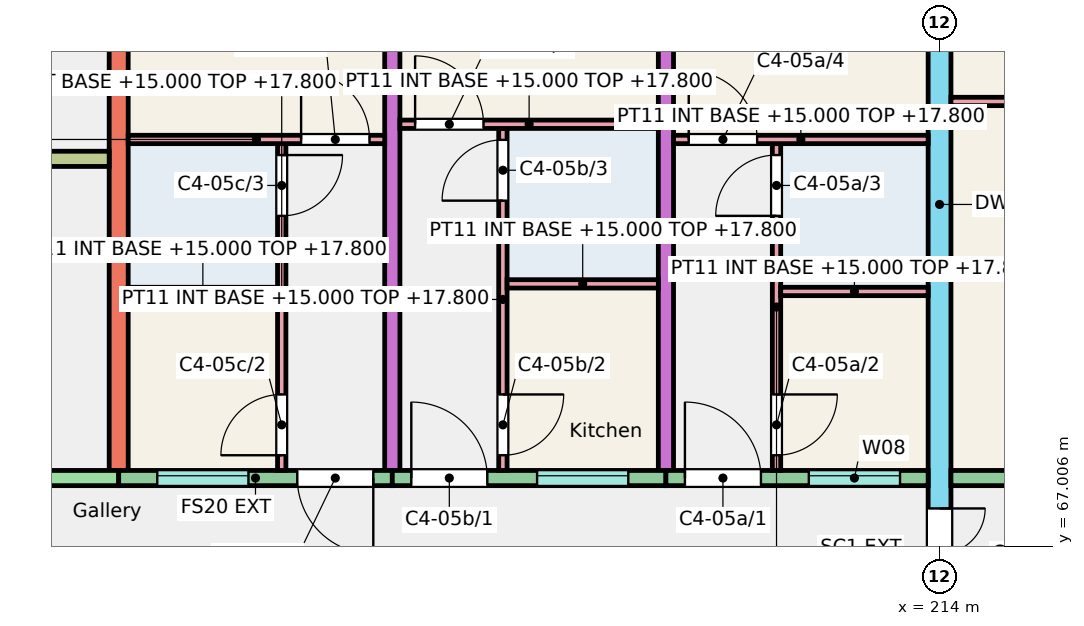
"""IFC4 building model, lengths in metres.
Left out: names, types, materials, properties, quantities, classifications, styles, units other than length and angle.
Written with IfcOpenShell. Run it as: python <this file> out.ifc"""

import sys

from ifc_helpers import new_model, si_unit, direction, frame, frame_2d, origin, place, context, subcontext, project, spatial, rectangle, extrude, element, fill, save


model = new_model("IFC4")
c1 = context("Model", 3, precision=1e-05, world=origin(), true_north=direction((0.0, 1.0)))
c2 = subcontext(c1, "Body", "Model", "MODEL_VIEW")
j1 = project(units=[si_unit("LENGTHUNIT", "METRE"), si_unit("PLANEANGLEUNIT", "RADIAN")], contexts=[c1])
p1 = place(None, origin())
s1 = spatial("IfcSite", under=j1, at=p1, CompositionType="ELEMENT")
p2 = place(p1, origin())
s2 = spatial("IfcBuilding", under=s1, at=p2, CompositionType="ELEMENT")
p3 = place(p2, frame((0.0, 0.0, 15.0)))
s3 = spatial("IfcBuildingStorey", under=s2, at=p3, CompositionType="ELEMENT", Elevation=15.0)
p4 = place(p3, frame((203.2, 68.0, 0.0), z_axis=(0.0, 0.0, 1.0), x_axis=(0.0, 1.0, 0.0)))
e1 = element("IfcWall", 1, at=p4, inside=s3, PredefinedType="SHEAR", context=c2, shape_type="SweptSolid", body=[
    extrude(rectangle(XDim=9.0, YDim=0.25, at=frame_2d((4.5, 0.0))), origin(), (0.0, 0.0, 1.0), 3.0),
])
for number, where, z_axis, x_axis in (
    (2, (206.8, 68.0, 0.0), (0.0, 0.0, 1.0), (0.0, 1.0, 0.0)),
    (3, (210.4, 68.0, 0.0), (0.0, 0.0, 1.0), (0.0, 1.0, 0.0)),
):
    element("IfcWall", number, at=place(p3, frame(where, z_axis=z_axis, x_axis=x_axis)), inside=s3, PredefinedType="SHEAR", context=c2, shape_type="SweptSolid", body=[
        extrude(rectangle(XDim=9.0, YDim=0.2, at=frame_2d((4.5, 0.0))), origin(), (0.0, 0.0, 1.0), 3.0),
    ])
p5 = place(p3, frame((214.0, 66.0, 0.0), z_axis=(0.0, 0.0, 1.0), x_axis=(0.0, 1.0, 0.0)))
e4 = element("IfcWall", 4, at=p5, inside=s3, PredefinedType="SHEAR", context=c2, shape_type="SweptSolid", body=[
    extrude(rectangle(XDim=11.0, YDim=0.3, at=frame_2d((5.5, 0.0))), origin(), (0.0, 0.0, 1.0), 3.0),
])
p6 = place(p5, frame((0.3, 0.0, 0.0)))
e5 = element("IfcOpeningElement", 5, at=p6, cuts=e4, PredefinedType="OPENING", context=c2, shape_type="SweptSolid", body=[
    extrude(rectangle(XDim=1.2, YDim=2.1, at=frame_2d((0.6, 1.05))), frame((0.0, 0.16, 0.0), z_axis=(0.0, -1.0, 0.0), x_axis=(1.0, 0.0, 0.0)), (0.0, 0.0, 1.0), 0.32),
])
p7 = place(p3, frame((197.35, 67.9, 0.0), z_axis=(0.0, 0.0, 1.0), x_axis=(1.0, 0.0, 0.0)))
e6 = element("IfcWall", 6, at=p7, inside=s3, PredefinedType="SHEAR", context=c2, shape_type="SweptSolid", body=[
    extrude(rectangle(XDim=5.85, YDim=0.2, at=frame_2d((2.925, 0.0))), origin(), (0.0, 0.0, 1.0), 3.0),
])
p8 = place(p7, frame((2.312, 0.0, 0.0)))
e7 = element("IfcOpeningElement", 7, at=p8, cuts=e6, PredefinedType="OPENING", context=c2, shape_type="SweptSolid", body=[
    extrude(rectangle(XDim=1.1, YDim=2.1, at=frame_2d((0.55, 1.05))), frame((0.0, 0.11, 0.0), z_axis=(0.0, -1.0, 0.0), x_axis=(1.0, 0.0, 0.0)), (0.0, 0.0, 1.0), 0.22),
])
p9 = place(p3, frame((197.35, 72.1, 0.0), z_axis=(0.0, 0.0, 1.0), x_axis=(1.0, 0.0, 0.0)))
e8 = element("IfcWall", 8, at=p9, inside=s3, PredefinedType="SHEAR", context=c2, shape_type="SweptSolid", body=[
    extrude(rectangle(XDim=5.725, YDim=0.2, at=frame_2d((2.862, 0.0))), origin(), (0.0, 0.0, 1.0), 3.0),
])
p10 = place(p9, frame((3.775, 0.0, 0.0)))
e9 = element("IfcOpeningElement", 9, at=p10, cuts=e8, PredefinedType="OPENING", context=c2, shape_type="SweptSolid", body=[
    extrude(rectangle(XDim=1.0, YDim=2.1, at=frame_2d((0.5, 1.05))), frame((0.0, 0.11, 0.0), z_axis=(0.0, -1.0, 0.0), x_axis=(1.0, 0.0, 0.0)), (0.0, 0.0, 1.0), 0.22),
])
p11 = place(p9, frame((0.762, 0.0, 0.0)))
e10 = element("IfcOpeningElement", 10, at=p11, cuts=e8, PredefinedType="OPENING", context=c2, shape_type="SweptSolid", body=[
    extrude(rectangle(XDim=1.1, YDim=2.1, at=frame_2d((0.55, 1.05))), frame((0.0, 0.11, 0.0), z_axis=(0.0, -1.0, 0.0), x_axis=(1.0, 0.0, 0.0)), (0.0, 0.0, 1.0), 0.22),
])
p12 = place(p3, frame((203.2, 67.9, 0.0), z_axis=(0.0, 0.0, 1.0), x_axis=(1.0, 0.0, 0.0)))
e11 = element("IfcWall", 11, at=p12, inside=s3, PredefinedType="SOLIDWALL", context=c2, shape_type="SweptSolid", body=[
    extrude(rectangle(XDim=3.6, YDim=0.2, at=frame_2d((1.8, 0.0))), origin(), (0.0, 0.0, 1.0), 3.0),
])
p13 = place(p12, frame((0.508, 0.0, 1.1)))
e12 = element("IfcOpeningElement", 12, at=p13, cuts=e11, PredefinedType="OPENING", context=c2, shape_type="SweptSolid", body=[
    extrude(rectangle(XDim=1.2, YDim=1.3, at=frame_2d((0.6, 0.65))), frame((0.0, 0.11, 0.0), z_axis=(0.0, -1.0, 0.0), x_axis=(1.0, 0.0, 0.0)), (0.0, 0.0, 1.0), 0.22),
])
p14 = place(p12, frame((2.35, 0.0, 0.0)))
e13 = element("IfcOpeningElement", 13, at=p14, cuts=e11, PredefinedType="OPENING", context=c2, shape_type="SweptSolid", body=[
    extrude(rectangle(XDim=1.0, YDim=2.1, at=frame_2d((0.5, 1.05))), frame((0.0, 0.11, 0.0), z_axis=(0.0, -1.0, 0.0), x_axis=(1.0, 0.0, 0.0)), (0.0, 0.0, 1.0), 0.22),
])
p15 = place(p3, frame((206.8, 67.9, 0.0), z_axis=(0.0, 0.0, 1.0), x_axis=(1.0, 0.0, 0.0)))
e14 = element("IfcWall", 14, at=p15, inside=s3, PredefinedType="SOLIDWALL", context=c2, shape_type="SweptSolid", body=[
    extrude(rectangle(XDim=3.6, YDim=0.2, at=frame_2d((1.8, 0.0))), origin(), (0.0, 0.0, 1.0), 3.0),
])
p16 = place(p15, frame((1.905, 0.0, 1.1)))
e15 = element("IfcOpeningElement", 15, at=p16, cuts=e14, PredefinedType="OPENING", context=c2, shape_type="SweptSolid", body=[
    extrude(rectangle(XDim=1.2, YDim=1.3, at=frame_2d((0.6, 0.65))), frame((0.0, 0.11, 0.0), z_axis=(0.0, -1.0, 0.0), x_axis=(1.0, 0.0, 0.0)), (0.0, 0.0, 1.0), 0.22),
])
p17 = place(p15, frame((0.25, 0.0, 0.0)))
e16 = element("IfcOpeningElement", 16, at=p17, cuts=e14, PredefinedType="OPENING", context=c2, shape_type="SweptSolid", body=[
    extrude(rectangle(XDim=1.0, YDim=2.1, at=frame_2d((0.5, 1.05))), frame((0.0, 0.11, 0.0), z_axis=(0.0, -1.0, 0.0), x_axis=(1.0, 0.0, 0.0)), (0.0, 0.0, 1.0), 0.22),
])
p18 = place(p3, frame((210.4, 67.9, 0.0), z_axis=(0.0, 0.0, 1.0), x_axis=(1.0, 0.0, 0.0)))
e17 = element("IfcWall", 17, at=p18, inside=s3, PredefinedType="SOLIDWALL", context=c2, shape_type="SweptSolid", body=[
    extrude(rectangle(XDim=3.45, YDim=0.2, at=frame_2d((1.725, 0.0))), origin(), (0.0, 0.0, 1.0), 3.0),
])
p19 = place(p18, frame((1.88, 0.0, 1.1)))
e18 = element("IfcOpeningElement", 18, at=p19, cuts=e17, PredefinedType="OPENING", context=c2, shape_type="SweptSolid", body=[
    extrude(rectangle(XDim=1.2, YDim=1.3, at=frame_2d((0.6, 0.65))), frame((0.0, 0.11, 0.0), z_axis=(0.0, -1.0, 0.0), x_axis=(1.0, 0.0, 0.0)), (0.0, 0.0, 1.0), 0.22),
])
p20 = place(p18, frame((0.25, 0.0, 0.0)))
e19 = element("IfcOpeningElement", 19, at=p20, cuts=e17, PredefinedType="OPENING", context=c2, shape_type="SweptSolid", body=[
    extrude(rectangle(XDim=1.0, YDim=2.1, at=frame_2d((0.5, 1.05))), frame((0.0, 0.11, 0.0), z_axis=(0.0, -1.0, 0.0), x_axis=(1.0, 0.0, 0.0)), (0.0, 0.0, 1.0), 0.22),
])
p21 = place(p3, frame((214.15, 67.9, 0.0), z_axis=(0.0, 0.0, 1.0), x_axis=(1.0, 0.0, 0.0)))
e20 = element("IfcWall", 20, at=p21, inside=s3, PredefinedType="SOLIDWALL", context=c2, shape_type="SweptSolid", body=[
    extrude(rectangle(XDim=3.45, YDim=0.2, at=frame_2d((1.725, 0.0))), origin(), (0.0, 0.0, 1.0), 3.0),
])
p22 = place(p21, frame((0.925, 0.0, 0.9)))
e21 = element("IfcOpeningElement", 21, at=p22, cuts=e20, PredefinedType="OPENING", context=c2, shape_type="SweptSolid", body=[
    extrude(rectangle(XDim=1.5, YDim=1.5, at=frame_2d((0.75, 0.75))), frame((0.0, 0.11, 0.0), z_axis=(0.0, -1.0, 0.0), x_axis=(1.0, 0.0, 0.0)), (0.0, 0.0, 1.0), 0.22),
])
p23 = place(p3, frame((211.855, 68.0, 0.0), z_axis=(0.0, 0.0, 1.0), x_axis=(0.0, 1.0, 0.0)))
e22 = element("IfcWall", 22, at=p23, inside=s3, PredefinedType="PARTITIONING", context=c2, shape_type="SweptSolid", body=[
    extrude(rectangle(XDim=4.3, YDim=0.11, at=frame_2d((2.15, 0.0))), origin(), (0.0, 0.0, 1.0), 2.8),
])
p24 = place(p23, frame((0.2, 0.0, 0.0)))
e23 = element("IfcOpeningElement", 23, at=p24, cuts=e22, PredefinedType="OPENING", context=c2, shape_type="SweptSolid", body=[
    extrude(rectangle(XDim=0.8, YDim=2.1, at=frame_2d((0.4, 1.05))), frame((0.0, 0.065, 0.0), z_axis=(0.0, -1.0, 0.0), x_axis=(1.0, 0.0, 0.0)), (0.0, 0.0, 1.0), 0.13),
])
p25 = place(p23, frame((3.35, 0.0, 0.0)))
e24 = element("IfcOpeningElement", 24, at=p25, cuts=e22, PredefinedType="OPENING", context=c2, shape_type="SweptSolid", body=[
    extrude(rectangle(XDim=0.8, YDim=2.1, at=frame_2d((0.4, 1.05))), frame((0.0, 0.065, 0.0), z_axis=(0.0, -1.0, 0.0), x_axis=(1.0, 0.0, 0.0)), (0.0, 0.0, 1.0), 0.13),
])
p26 = place(p3, frame((211.91, 70.355, 0.0), z_axis=(0.0, 0.0, 1.0), x_axis=(1.0, 0.0, 0.0)))
e25 = element("IfcWall", 25, at=p26, inside=s3, PredefinedType="PARTITIONING", context=c2, shape_type="SweptSolid", body=[
    extrude(rectangle(XDim=1.94, YDim=0.11, at=frame_2d((0.97, 0.0))), origin(), (0.0, 0.0, 1.0), 2.8),
])
p27 = place(p3, frame((210.5, 72.355, 0.0), z_axis=(0.0, 0.0, 1.0), x_axis=(1.0, 0.0, 0.0)))
e26 = element("IfcWall", 26, at=p27, inside=s3, PredefinedType="PARTITIONING", context=c2, shape_type="SweptSolid", body=[
    extrude(rectangle(XDim=3.35, YDim=0.11, at=frame_2d((1.675, 0.0))), origin(), (0.0, 0.0, 1.0), 2.8),
])
p28 = place(p27, frame((0.2, 0.0, 0.0)))
e27 = element("IfcOpeningElement", 27, at=p28, cuts=e26, PredefinedType="OPENING", context=c2, shape_type="SweptSolid", body=[
    extrude(rectangle(XDim=0.9, YDim=2.1, at=frame_2d((0.45, 1.05))), frame((0.0, 0.065, 0.0), z_axis=(0.0, -1.0, 0.0), x_axis=(1.0, 0.0, 0.0)), (0.0, 0.0, 1.0), 0.13),
])
p29 = place(p3, frame((208.255, 68.0, 0.0), z_axis=(0.0, 0.0, 1.0), x_axis=(0.0, 1.0, 0.0)))
e28 = element("IfcWall", 28, at=p29, inside=s3, PredefinedType="PARTITIONING", context=c2, shape_type="SweptSolid", body=[
    extrude(rectangle(XDim=4.5, YDim=0.11, at=frame_2d((2.25, 0.0))), origin(), (0.0, 0.0, 1.0), 2.8),
])
p30 = place(p29, frame((0.2, 0.0, 0.0)))
e29 = element("IfcOpeningElement", 29, at=p30, cuts=e28, PredefinedType="OPENING", context=c2, shape_type="SweptSolid", body=[
    extrude(rectangle(XDim=0.8, YDim=2.1, at=frame_2d((0.4, 1.05))), frame((0.0, 0.065, 0.0), z_axis=(0.0, -1.0, 0.0), x_axis=(1.0, 0.0, 0.0)), (0.0, 0.0, 1.0), 0.13),
])
p31 = place(p29, frame((3.55, 0.0, 0.0)))
e30 = element("IfcOpeningElement", 30, at=p31, cuts=e28, PredefinedType="OPENING", context=c2, shape_type="SweptSolid", body=[
    extrude(rectangle(XDim=0.8, YDim=2.1, at=frame_2d((0.4, 1.05))), frame((0.0, 0.065, 0.0), z_axis=(0.0, -1.0, 0.0), x_axis=(1.0, 0.0, 0.0)), (0.0, 0.0, 1.0), 0.13),
])
p32 = place(p3, frame((208.31, 70.455, 0.0), z_axis=(0.0, 0.0, 1.0), x_axis=(1.0, 0.0, 0.0)))
e31 = element("IfcWall", 31, at=p32, inside=s3, PredefinedType="PARTITIONING", context=c2, shape_type="SweptSolid", body=[
    extrude(rectangle(XDim=1.99, YDim=0.11, at=frame_2d((0.995, 0.0))), origin(), (0.0, 0.0, 1.0), 2.8),
])
p33 = place(p3, frame((206.9, 72.555, 0.0), z_axis=(0.0, 0.0, 1.0), x_axis=(1.0, 0.0, 0.0)))
e32 = element("IfcWall", 32, at=p33, inside=s3, PredefinedType="PARTITIONING", context=c2, shape_type="SweptSolid", body=[
    extrude(rectangle(XDim=3.4, YDim=0.11, at=frame_2d((1.7, 0.0))), origin(), (0.0, 0.0, 1.0), 2.8),
])
p34 = place(p33, frame((0.2, 0.0, 0.0)))
e33 = element("IfcOpeningElement", 33, at=p34, cuts=e32, PredefinedType="OPENING", context=c2, shape_type="SweptSolid", body=[
    extrude(rectangle(XDim=0.9, YDim=2.1, at=frame_2d((0.45, 1.05))), frame((0.0, 0.065, 0.0), z_axis=(0.0, -1.0, 0.0), x_axis=(1.0, 0.0, 0.0)), (0.0, 0.0, 1.0), 0.13),
])
p35 = place(p3, frame((203.325, 70.355, 0.0), z_axis=(0.0, 0.0, 1.0), x_axis=(1.0, 0.0, 0.0)))
e34 = element("IfcWall", 34, at=p35, inside=s3, PredefinedType="PARTITIONING", context=c2, shape_type="SweptSolid", body=[
    extrude(rectangle(XDim=1.965, YDim=0.11, at=frame_2d((0.982, 0.0))), origin(), (0.0, 0.0, 1.0), 2.8),
])
p36 = place(p3, frame((205.345, 68.0, 0.0), z_axis=(0.0, 0.0, 1.0), x_axis=(0.0, 1.0, 0.0)))
e35 = element("IfcWall", 35, at=p36, inside=s3, PredefinedType="PARTITIONING", context=c2, shape_type="SweptSolid", body=[
    extrude(rectangle(XDim=4.3, YDim=0.11, at=frame_2d((2.15, 0.0))), origin(), (0.0, 0.0, 1.0), 2.8),
])
p37 = place(p36, frame((0.2, 0.0, 0.0)))
e36 = element("IfcOpeningElement", 36, at=p37, cuts=e35, PredefinedType="OPENING", context=c2, shape_type="SweptSolid", body=[
    extrude(rectangle(XDim=0.8, YDim=2.1, at=frame_2d((0.4, 1.05))), frame((0.0, 0.065, 0.0), z_axis=(0.0, -1.0, 0.0), x_axis=(1.0, 0.0, 0.0)), (0.0, 0.0, 1.0), 0.13),
])
p38 = place(p36, frame((3.35, 0.0, 0.0)))
e37 = element("IfcOpeningElement", 37, at=p38, cuts=e35, PredefinedType="OPENING", context=c2, shape_type="SweptSolid", body=[
    extrude(rectangle(XDim=0.8, YDim=2.1, at=frame_2d((0.4, 1.05))), frame((0.0, 0.065, 0.0), z_axis=(0.0, -1.0, 0.0), x_axis=(1.0, 0.0, 0.0)), (0.0, 0.0, 1.0), 0.13),
])
p39 = place(p3, frame((203.325, 72.355, 0.0), z_axis=(0.0, 0.0, 1.0), x_axis=(1.0, 0.0, 0.0)))
e38 = element("IfcWall", 38, at=p39, inside=s3, PredefinedType="PARTITIONING", context=c2, shape_type="SweptSolid", body=[
    extrude(rectangle(XDim=3.375, YDim=0.11, at=frame_2d((1.688, 0.0))), origin(), (0.0, 0.0, 1.0), 2.8),
])
p40 = place(p39, frame((2.275, 0.0, 0.0)))
e39 = element("IfcOpeningElement", 39, at=p40, cuts=e38, PredefinedType="OPENING", context=c2, shape_type="SweptSolid", body=[
    extrude(rectangle(XDim=0.9, YDim=2.1, at=frame_2d((0.45, 1.05))), frame((0.0, 0.065, 0.0), z_axis=(0.0, -1.0, 0.0), x_axis=(1.0, 0.0, 0.0)), (0.0, 0.0, 1.0), 0.13),
])
p41 = place(p3, frame((214.15, 72.855, 0.0), z_axis=(0.0, 0.0, 1.0), x_axis=(1.0, 0.0, 0.0)))
e40 = element("IfcWall", 40, at=p41, inside=s3, PredefinedType="PARTITIONING", context=c2, shape_type="SweptSolid", body=[
    extrude(rectangle(XDim=3.35, YDim=0.11, at=frame_2d((1.675, 0.0))), origin(), (0.0, 0.0, 1.0), 2.8),
])
p42 = place(p19, origin())
e41 = element("IfcWindow", 41, at=p42, inside=s3, PartitioningType="SINGLE_PANEL", PredefinedType="WINDOW", context=c2, shape_type="SweptSolid", body=[
    extrude(rectangle(XDim=1.2, YDim=1.3, at=frame_2d((0.6, 0.65))), frame((0.0, 0.06, 0.0), z_axis=(0.0, -1.0, 0.0), x_axis=(1.0, 0.0, 0.0)), (0.0, 0.0, 1.0), 0.06),
])
fill(e18, e41)
p43 = place(p16, origin())
e42 = element("IfcWindow", 42, at=p43, inside=s3, PartitioningType="SINGLE_PANEL", PredefinedType="WINDOW", context=c2, shape_type="SweptSolid", body=[
    extrude(rectangle(XDim=1.2, YDim=1.3, at=frame_2d((0.6, 0.65))), frame((0.0, 0.06, 0.0), z_axis=(0.0, -1.0, 0.0), x_axis=(1.0, 0.0, 0.0)), (0.0, 0.0, 1.0), 0.06),
])
fill(e15, e42)
p44 = place(p13, origin())
e43 = element("IfcWindow", 43, at=p44, inside=s3, PartitioningType="SINGLE_PANEL", PredefinedType="WINDOW", context=c2, shape_type="SweptSolid", body=[
    extrude(rectangle(XDim=1.2, YDim=1.3, at=frame_2d((0.6, 0.65))), frame((0.0, 0.06, 0.0), z_axis=(0.0, -1.0, 0.0), x_axis=(1.0, 0.0, 0.0)), (0.0, 0.0, 1.0), 0.06),
])
fill(e12, e43)
p45 = place(p20, origin())
e44 = element("IfcDoor", 44, at=p45, inside=s3, OperationType="SINGLE_SWING_LEFT", PredefinedType="DOOR", context=c2, shape_type="SweptSolid", body=[
    extrude(rectangle(XDim=1.0, YDim=2.1, at=frame_2d((0.5, 1.05))), frame((0.0, 0.025, 0.0), z_axis=(0.0, -1.0, 0.0), x_axis=(1.0, 0.0, 0.0)), (0.0, 0.0, 1.0), 0.05),
])
fill(e19, e44)
p46 = place(p24, origin())
e45 = element("IfcDoor", 45, at=p46, inside=s3, OperationType="SINGLE_SWING_RIGHT", PredefinedType="DOOR", context=c2, shape_type="SweptSolid", body=[
    extrude(rectangle(XDim=0.8, YDim=2.1, at=frame_2d((0.4, 1.05))), frame((0.0, 0.025, 0.0), z_axis=(0.0, -1.0, 0.0), x_axis=(1.0, 0.0, 0.0)), (0.0, 0.0, 1.0), 0.05),
])
fill(e23, e45)
p47 = place(p25, origin())
e46 = element("IfcDoor", 46, at=p47, inside=s3, OperationType="SINGLE_SWING_LEFT", PredefinedType="DOOR", context=c2, shape_type="SweptSolid", body=[
    extrude(rectangle(XDim=0.8, YDim=2.1, at=frame_2d((0.4, 1.05))), frame((0.0, 0.025, 0.0), z_axis=(0.0, -1.0, 0.0), x_axis=(1.0, 0.0, 0.0)), (0.0, 0.0, 1.0), 0.05),
])
fill(e24, e46)
p48 = place(p28, origin())
e47 = element("IfcDoor", 47, at=p48, inside=s3, OperationType="SINGLE_SWING_LEFT", PredefinedType="DOOR", context=c2, shape_type="SweptSolid", body=[
    extrude(rectangle(XDim=0.9, YDim=2.1, at=frame_2d((0.45, 1.05))), frame((0.0, 0.025, 0.0), z_axis=(0.0, -1.0, 0.0), x_axis=(1.0, 0.0, 0.0)), (0.0, 0.0, 1.0), 0.05),
])
fill(e27, e47)
p49 = place(p17, origin())
e48 = element("IfcDoor", 48, at=p49, inside=s3, OperationType="SINGLE_SWING_LEFT", PredefinedType="DOOR", context=c2, shape_type="SweptSolid", body=[
    extrude(rectangle(XDim=1.0, YDim=2.1, at=frame_2d((0.5, 1.05))), frame((0.0, 0.025, 0.0), z_axis=(0.0, -1.0, 0.0), x_axis=(1.0, 0.0, 0.0)), (0.0, 0.0, 1.0), 0.05),
])
fill(e16, e48)
p50 = place(p30, origin())
e49 = element("IfcDoor", 49, at=p50, inside=s3, OperationType="SINGLE_SWING_RIGHT", PredefinedType="DOOR", context=c2, shape_type="SweptSolid", body=[
    extrude(rectangle(XDim=0.8, YDim=2.1, at=frame_2d((0.4, 1.05))), frame((0.0, 0.025, 0.0), z_axis=(0.0, -1.0, 0.0), x_axis=(1.0, 0.0, 0.0)), (0.0, 0.0, 1.0), 0.05),
])
fill(e29, e49)
p51 = place(p31, origin())
e50 = element("IfcDoor", 50, at=p51, inside=s3, OperationType="SINGLE_SWING_LEFT", PredefinedType="DOOR", context=c2, shape_type="SweptSolid", body=[
    extrude(rectangle(XDim=0.8, YDim=2.1, at=frame_2d((0.4, 1.05))), frame((0.0, 0.025, 0.0), z_axis=(0.0, -1.0, 0.0), x_axis=(1.0, 0.0, 0.0)), (0.0, 0.0, 1.0), 0.05),
])
fill(e30, e50)
p52 = place(p34, origin())
e51 = element("IfcDoor", 51, at=p52, inside=s3, OperationType="SINGLE_SWING_LEFT", PredefinedType="DOOR", context=c2, shape_type="SweptSolid", body=[
    extrude(rectangle(XDim=0.9, YDim=2.1, at=frame_2d((0.45, 1.05))), frame((0.0, 0.025, 0.0), z_axis=(0.0, -1.0, 0.0), x_axis=(1.0, 0.0, 0.0)), (0.0, 0.0, 1.0), 0.05),
])
fill(e33, e51)
p53 = place(p14, origin())
e52 = element("IfcDoor", 52, at=p53, inside=s3, OperationType="SINGLE_SWING_RIGHT", PredefinedType="DOOR", context=c2, shape_type="SweptSolid", body=[
    extrude(rectangle(XDim=1.0, YDim=2.1, at=frame_2d((0.5, 1.05))), frame((0.0, 0.025, 0.0), z_axis=(0.0, -1.0, 0.0), x_axis=(1.0, 0.0, 0.0)), (0.0, 0.0, 1.0), 0.05),
])
fill(e13, e52)
p54 = place(p37, origin())
e53 = element("IfcDoor", 53, at=p54, inside=s3, OperationType="SINGLE_SWING_LEFT", PredefinedType="DOOR", context=c2, shape_type="SweptSolid", body=[
    extrude(rectangle(XDim=0.8, YDim=2.1, at=frame_2d((0.4, 1.05))), frame((0.0, 0.025, 0.0), z_axis=(0.0, -1.0, 0.0), x_axis=(1.0, 0.0, 0.0)), (0.0, 0.0, 1.0), 0.05),
])
fill(e36, e53)
p55 = place(p38, origin())
e54 = element("IfcDoor", 54, at=p55, inside=s3, OperationType="SINGLE_SWING_RIGHT", PredefinedType="DOOR", context=c2, shape_type="SweptSolid", body=[
    extrude(rectangle(XDim=0.8, YDim=2.1, at=frame_2d((0.4, 1.05))), frame((0.0, 0.025, 0.0), z_axis=(0.0, -1.0, 0.0), x_axis=(1.0, 0.0, 0.0)), (0.0, 0.0, 1.0), 0.05),
])
fill(e37, e54)
p56 = place(p40, origin())
e55 = element("IfcDoor", 55, at=p56, inside=s3, OperationType="SINGLE_SWING_LEFT", PredefinedType="DOOR", context=c2, shape_type="SweptSolid", body=[
    extrude(rectangle(XDim=0.9, YDim=2.1, at=frame_2d((0.45, 1.05))), frame((0.0, 0.025, 0.0), z_axis=(0.0, -1.0, 0.0), x_axis=(1.0, 0.0, 0.0)), (0.0, 0.0, 1.0), 0.05),
])
fill(e39, e55)
p57 = place(p6, origin())
e56 = element("IfcDoor", 56, at=p57, inside=s3, OperationType="DOUBLE_DOOR_SINGLE_SWING", PredefinedType="DOOR", context=c2, shape_type="SweptSolid", body=[
    extrude(rectangle(XDim=1.2, YDim=2.1, at=frame_2d((0.6, 1.05))), frame((0.0, 0.025, 0.0), z_axis=(0.0, -1.0, 0.0), x_axis=(1.0, 0.0, 0.0)), (0.0, 0.0, 1.0), 0.05),
])
fill(e5, e56)
save(model, sys.argv[1])
